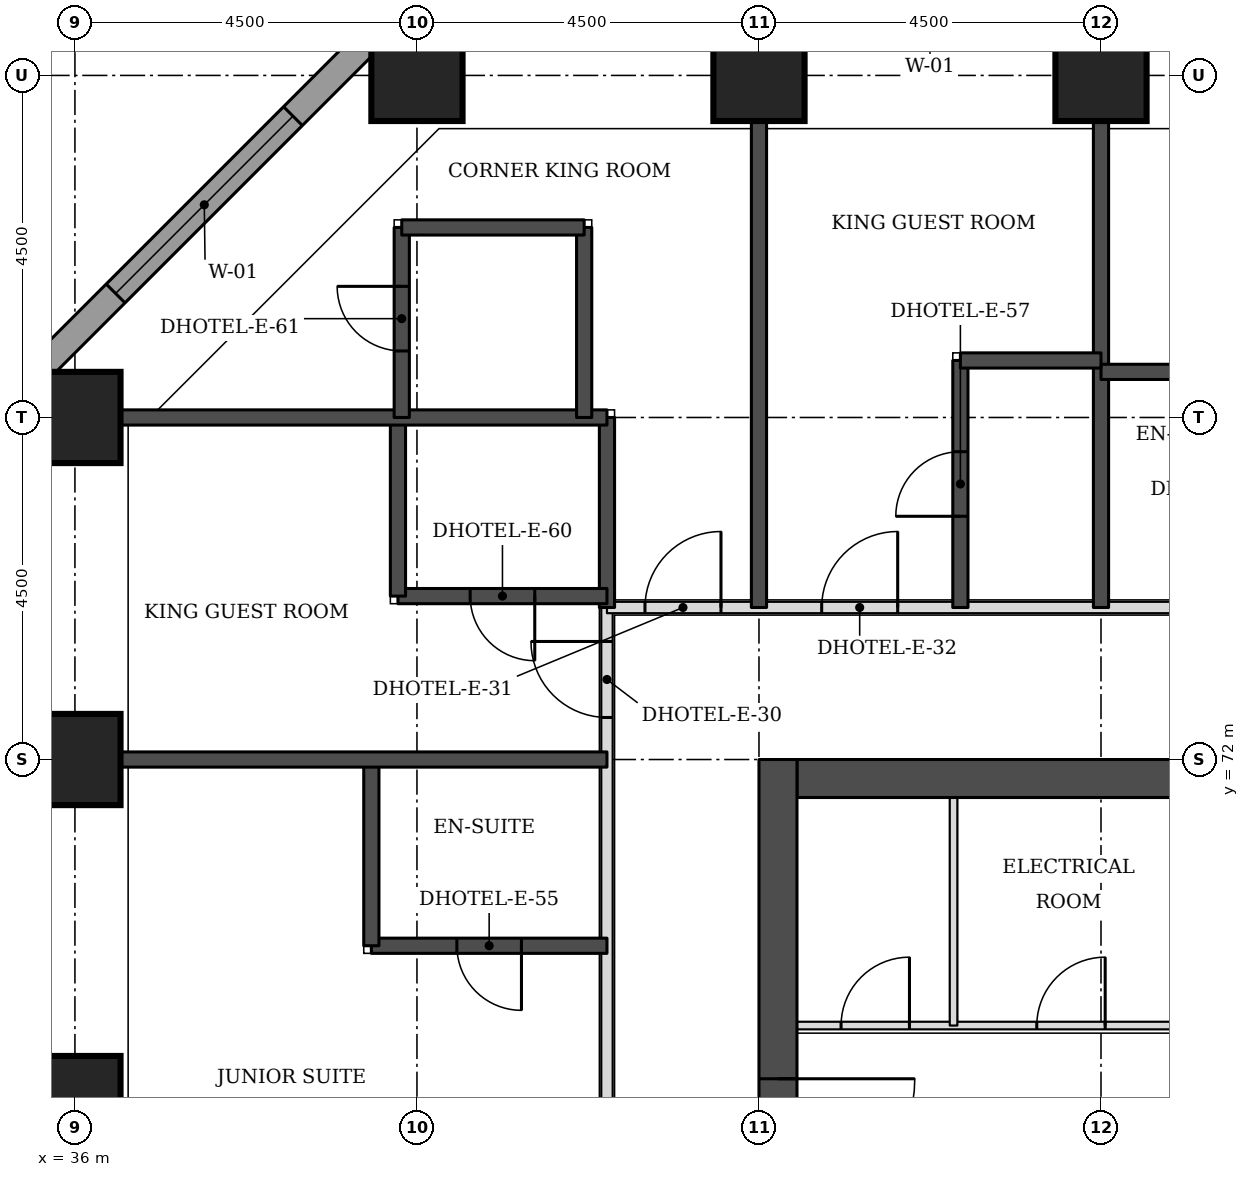
"""IFC4 building model, lengths in metres.
Left out: names, types, materials, properties, quantities, classifications, styles, units other than length and angle.
Written with IfcOpenShell. Run it as: python <this file> out.ifc"""

import sys

from ifc_helpers import new_model, si_unit, direction, frame, frame_2d, origin, origin_2d, place, context, subcontext, project, spatial, rectangle, extrude, element, fill, save


model = new_model("IFC4")
c1 = context("Model", 3, precision=1e-05, world=origin(), true_north=direction((0.0, 1.0)))
c2 = subcontext(c1, "Body", "Model", "MODEL_VIEW")
j1 = project(units=[si_unit("LENGTHUNIT", "METRE"), si_unit("PLANEANGLEUNIT", "RADIAN")], contexts=[c1])
p1 = place(None, origin())
s1 = spatial("IfcSite", under=j1, at=p1, CompositionType="ELEMENT")
p2 = place(p1, origin())
s2 = spatial("IfcBuilding", under=s1, at=p2, CompositionType="ELEMENT")
p3 = place(p2, frame((0.0, 0.0, 39.6)))
s3 = spatial("IfcBuildingStorey", under=s2, at=p3, CompositionType="ELEMENT", Elevation=39.6)
for number, where, z_axis, x_axis in (
    (1, (36.0, 67.5, 0.0), (0.0, 0.0, 1.0), (1.0, 0.0, 0.0)),
    (2, (36.0, 72.0, 0.0), (0.0, 0.0, 1.0), (1.0, 0.0, 0.0)),
    (3, (36.0, 76.5, 0.0), (0.0, 0.0, 1.0), (1.0, 0.0, 0.0)),
    (4, (40.5, 81.0, 0.0), (0.0, 0.0, 1.0), (1.0, 0.0, 0.0)),
    (5, (45.0, 81.0, 0.0), (0.0, 0.0, 1.0), (1.0, 0.0, 0.0)),
    (6, (49.5, 81.0, 0.0), (0.0, 0.0, 1.0), (1.0, 0.0, 0.0)),
):
    element("IfcColumn", number, at=place(p3, frame(where, z_axis=z_axis, x_axis=x_axis)), inside=s3, PredefinedType="COLUMN", context=c2, shape_type="SweptSolid", body=[
        extrude(rectangle(XDim=1.2, YDim=1.2, at=origin_2d()), origin(), (0.0, 0.0, 1.0), 3.3),
    ])
p4 = place(p3, frame((45.5, 71.75, 0.0), z_axis=(0.0, 0.0, 1.0), x_axis=(1.0, 0.0, 0.0)))
e7 = element("IfcWall", 7, at=p4, inside=s3, PredefinedType="SHEAR", context=c2, shape_type="SweptSolid", body=[
    extrude(rectangle(XDim=21.5, YDim=0.5, at=frame_2d((10.75, 0.0))), origin(), (0.0, 0.0, 1.0), 3.3),
])
p5 = place(p3, frame((45.25, 49.5, 0.0), z_axis=(0.0, 0.0, 1.0), x_axis=(0.0, 1.0, 0.0)))
e8 = element("IfcWall", 8, at=p5, inside=s3, PredefinedType="SHEAR", context=c2, shape_type="SweptSolid", body=[
    extrude(rectangle(XDim=22.5, YDim=0.5, at=frame_2d((11.25, 0.0))), origin(), (0.0, 0.0, 1.0), 3.3),
])
p6 = place(p5, frame((4.2, 0.0, 0.0)))
e9 = element("IfcOpeningElement", 9, at=p6, cuts=e8, PredefinedType="OPENING", context=c2, shape_type="SweptSolid", body=[
    extrude(rectangle(XDim=1.8, YDim=2.1, at=frame_2d((0.9, 1.05))), frame((0.0, 0.26, 0.0), z_axis=(0.0, -1.0, 0.0), x_axis=(1.0, 0.0, 0.0)), (0.0, 0.0, 1.0), 0.52),
])
p7 = place(p5, frame((6.9, 0.0, 0.0)))
e10 = element("IfcOpeningElement", 10, at=p7, cuts=e8, PredefinedType="OPENING", context=c2, shape_type="SweptSolid", body=[
    extrude(rectangle(XDim=1.1, YDim=2.1, at=frame_2d((0.55, 1.05))), frame((0.0, 0.26, 0.0), z_axis=(0.0, -1.0, 0.0), x_axis=(1.0, 0.0, 0.0)), (0.0, 0.0, 1.0), 0.52),
])
p8 = place(p5, frame((13.6, 0.0, 0.0)))
e11 = element("IfcOpeningElement", 11, at=p8, cuts=e8, PredefinedType="OPENING", context=c2, shape_type="SweptSolid", body=[
    extrude(rectangle(XDim=1.1, YDim=2.1, at=frame_2d((0.55, 1.05))), frame((0.0, 0.26, 0.0), z_axis=(0.0, -1.0, 0.0), x_axis=(1.0, 0.0, 0.0)), (0.0, 0.0, 1.0), 0.52),
])
p9 = place(p5, frame((16.5, 0.0, 0.0)))
e12 = element("IfcOpeningElement", 12, at=p9, cuts=e8, PredefinedType="OPENING", context=c2, shape_type="SweptSolid", body=[
    extrude(rectangle(XDim=1.8, YDim=2.1, at=frame_2d((0.9, 1.05))), frame((0.0, 0.26, 0.0), z_axis=(0.0, -1.0, 0.0), x_axis=(1.0, 0.0, 0.0)), (0.0, 0.0, 1.0), 0.52),
])
p10 = place(p3, frame((40.23, 81.826, 0.0), z_axis=(0.0, 0.0, 1.0), x_axis=(-0.707106781187, -0.707106781187, 0.0)))
e13 = element("IfcWall", 13, at=p10, inside=s3, PredefinedType="STANDARD", context=c2, shape_type="SweptSolid", body=[
    extrude(rectangle(XDim=7.151, YDim=0.35, at=frame_2d((3.576, 0.0))), origin(), (0.0, 0.0, 1.0), 3.055),
])
p11 = place(p10, frame((1.926, 0.0, 0.8)))
e14 = element("IfcOpeningElement", 14, at=p11, cuts=e13, PredefinedType="OPENING", context=c2, shape_type="SweptSolid", body=[
    extrude(rectangle(XDim=3.3, YDim=1.5, at=frame_2d((1.65, 0.75))), frame((0.0, 0.185, 0.0), z_axis=(0.0, -1.0, 0.0), x_axis=(1.0, 0.0, 0.0)), (0.0, 0.0, 1.0), 0.37),
])
p12 = place(p3, frame((43.0, 57.35, 0.0), z_axis=(0.0, 0.0, 1.0), x_axis=(0.0, 1.0, 0.0)))
e15 = element("IfcWall", 15, at=p12, inside=s3, PredefinedType="PARTITIONING", context=c2, shape_type="SweptSolid", body=[
    extrude(rectangle(XDim=16.65, YDim=0.15, at=frame_2d((8.325, 0.0))), origin(), (0.0, 0.0, 1.0), 3.08),
])
p13 = place(p12, frame((8.425, 0.0, 0.0)))
e16 = element("IfcOpeningElement", 16, at=p13, cuts=e15, PredefinedType="OPENING", context=c2, shape_type="SweptSolid", body=[
    extrude(rectangle(XDim=1.0, YDim=2.1, at=frame_2d((0.5, 1.05))), frame((0.0, 0.085, 0.0), z_axis=(0.0, -1.0, 0.0), x_axis=(1.0, 0.0, 0.0)), (0.0, 0.0, 1.0), 0.17),
])
p14 = place(p12, frame((15.203, 0.0, 0.0)))
e17 = element("IfcOpeningElement", 17, at=p14, cuts=e15, PredefinedType="OPENING", context=c2, shape_type="SweptSolid", body=[
    extrude(rectangle(XDim=1.0, YDim=2.1, at=frame_2d((0.5, 1.05))), frame((0.0, 0.085, 0.0), z_axis=(0.0, -1.0, 0.0), x_axis=(1.0, 0.0, 0.0)), (0.0, 0.0, 1.0), 0.17),
])
p15 = place(p3, frame((43.0, 74.0, 0.0), z_axis=(0.0, 0.0, 1.0), x_axis=(1.0, 0.0, 0.0)))
e18 = element("IfcWall", 18, at=p15, inside=s3, PredefinedType="PARTITIONING", context=c2, shape_type="SweptSolid", body=[
    extrude(rectangle(XDim=26.5, YDim=0.15, at=frame_2d((13.25, 0.0))), origin(), (0.0, 0.0, 1.0), 3.08),
])
p16 = place(p15, frame((2.825, 0.0, 0.0)))
e19 = element("IfcOpeningElement", 19, at=p16, cuts=e18, PredefinedType="OPENING", context=c2, shape_type="SweptSolid", body=[
    extrude(rectangle(XDim=1.0, YDim=2.1, at=frame_2d((0.5, 1.05))), frame((0.0, 0.085, 0.0), z_axis=(0.0, -1.0, 0.0), x_axis=(1.0, 0.0, 0.0)), (0.0, 0.0, 1.0), 0.17),
])
p17 = place(p15, frame((11.975, 0.0, 0.0)))
e20 = element("IfcOpeningElement", 20, at=p17, cuts=e18, PredefinedType="OPENING", context=c2, shape_type="SweptSolid", body=[
    extrude(rectangle(XDim=1.0, YDim=2.1, at=frame_2d((0.5, 1.05))), frame((0.0, 0.085, 0.0), z_axis=(0.0, -1.0, 0.0), x_axis=(1.0, 0.0, 0.0)), (0.0, 0.0, 1.0), 0.17),
])
p18 = place(p15, frame((18.275, 0.0, 0.0)))
e21 = element("IfcOpeningElement", 21, at=p18, cuts=e18, PredefinedType="OPENING", context=c2, shape_type="SweptSolid", body=[
    extrude(rectangle(XDim=1.0, YDim=2.1, at=frame_2d((0.5, 1.05))), frame((0.0, 0.085, 0.0), z_axis=(0.0, -1.0, 0.0), x_axis=(1.0, 0.0, 0.0)), (0.0, 0.0, 1.0), 0.17),
])
p19 = place(p15, frame((0.5, 0.0, 0.0)))
e22 = element("IfcOpeningElement", 22, at=p19, cuts=e18, PredefinedType="OPENING", context=c2, shape_type="SweptSolid", body=[
    extrude(rectangle(XDim=1.0, YDim=2.1, at=frame_2d((0.5, 1.05))), frame((0.0, 0.085, 0.0), z_axis=(0.0, -1.0, 0.0), x_axis=(1.0, 0.0, 0.0)), (0.0, 0.0, 1.0), 0.17),
])
p20 = place(p15, frame((25.0, 0.0, 0.0)))
e23 = element("IfcOpeningElement", 23, at=p20, cuts=e18, PredefinedType="OPENING", context=c2, shape_type="SweptSolid", body=[
    extrude(rectangle(XDim=1.0, YDim=2.1, at=frame_2d((0.5, 1.05))), frame((0.0, 0.085, 0.0), z_axis=(0.0, -1.0, 0.0), x_axis=(1.0, 0.0, 0.0)), (0.0, 0.0, 1.0), 0.17),
])
p21 = place(p3, frame((39.9, 69.55, 0.0), z_axis=(0.0, 0.0, 1.0), x_axis=(1.0, 0.0, 0.0)))
e24 = element("IfcWall", 24, at=p21, inside=s3, PredefinedType="SOLIDWALL", context=c2, shape_type="SweptSolid", body=[
    extrude(rectangle(XDim=3.1, YDim=0.2, at=frame_2d((1.55, 0.0))), origin(), (0.0, 0.0, 1.0), 3.08),
])
p22 = place(p21, frame((1.125, 0.0, 0.0)))
e25 = element("IfcOpeningElement", 25, at=p22, cuts=e24, PredefinedType="OPENING", context=c2, shape_type="SweptSolid", body=[
    extrude(rectangle(XDim=0.85, YDim=2.1, at=frame_2d((0.425, 1.05))), frame((0.0, 0.11, 0.0), z_axis=(0.0, -1.0, 0.0), x_axis=(1.0, 0.0, 0.0)), (0.0, 0.0, 1.0), 0.22),
])
p23 = place(p3, frame((39.9, 69.55, 0.0), z_axis=(0.0, 0.0, 1.0), x_axis=(0.0, 1.0, 0.0)))
e26 = element("IfcWall", 26, at=p23, inside=s3, PredefinedType="SOLIDWALL", context=c2, shape_type="SweptSolid", body=[
    extrude(rectangle(XDim=2.45, YDim=0.2, at=frame_2d((1.225, 0.0))), origin(), (0.0, 0.0, 1.0), 3.08),
])
p24 = place(p3, frame((36.6, 72.0, 0.0), z_axis=(0.0, 0.0, 1.0), x_axis=(1.0, 0.0, 0.0)))
e27 = element("IfcWall", 27, at=p24, inside=s3, PredefinedType="SOLIDWALL", context=c2, shape_type="SweptSolid", body=[
    extrude(rectangle(XDim=6.4, YDim=0.2, at=frame_2d((3.2, 0.0))), origin(), (0.0, 0.0, 1.0), 3.08),
])
p25 = place(p3, frame((43.0, 74.0, 0.0), z_axis=(0.0, 0.0, 1.0), x_axis=(0.0, 1.0, 0.0)))
e28 = element("IfcWall", 28, at=p25, inside=s3, PredefinedType="SOLIDWALL", context=c2, shape_type="SweptSolid", body=[
    extrude(rectangle(XDim=2.5, YDim=0.2, at=frame_2d((1.25, 0.0))), origin(), (0.0, 0.0, 1.0), 3.08),
])
p26 = place(p3, frame((45.0, 74.0, 0.0), z_axis=(0.0, 0.0, 1.0), x_axis=(0.0, 1.0, 0.0)))
e29 = element("IfcWall", 29, at=p26, inside=s3, PredefinedType="SOLIDWALL", context=c2, shape_type="SweptSolid", body=[
    extrude(rectangle(XDim=6.4, YDim=0.2, at=frame_2d((3.2, 0.0))), origin(), (0.0, 0.0, 1.0), 3.08),
])
p27 = place(p3, frame((47.65, 74.0, 0.0), z_axis=(0.0, 0.0, 1.0), x_axis=(0.0, 1.0, 0.0)))
e30 = element("IfcWall", 30, at=p27, inside=s3, PredefinedType="SOLIDWALL", context=c2, shape_type="SweptSolid", body=[
    extrude(rectangle(XDim=3.25, YDim=0.2, at=frame_2d((1.625, 0.0))), origin(), (0.0, 0.0, 1.0), 3.08),
])
p28 = place(p27, frame((1.2, 0.0, 0.0)))
e31 = element("IfcOpeningElement", 31, at=p28, cuts=e30, PredefinedType="OPENING", context=c2, shape_type="SweptSolid", body=[
    extrude(rectangle(XDim=0.85, YDim=2.1, at=frame_2d((0.425, 1.05))), frame((0.0, 0.11, 0.0), z_axis=(0.0, -1.0, 0.0), x_axis=(1.0, 0.0, 0.0)), (0.0, 0.0, 1.0), 0.22),
])
p29 = place(p3, frame((49.5, 74.0, 0.0), z_axis=(0.0, 0.0, 1.0), x_axis=(0.0, 1.0, 0.0)))
e32 = element("IfcWall", 32, at=p29, inside=s3, PredefinedType="SOLIDWALL", context=c2, shape_type="SweptSolid", body=[
    extrude(rectangle(XDim=6.4, YDim=0.2, at=frame_2d((3.2, 0.0))), origin(), (0.0, 0.0, 1.0), 3.08),
])
p30 = place(p3, frame((40.25, 74.15, 0.0), z_axis=(0.0, 0.0, 1.0), x_axis=(1.0, 0.0, 0.0)))
e33 = element("IfcWall", 33, at=p30, inside=s3, PredefinedType="SOLIDWALL", context=c2, shape_type="SweptSolid", body=[
    extrude(rectangle(XDim=2.75, YDim=0.2, at=frame_2d((1.375, 0.0))), origin(), (0.0, 0.0, 1.0), 3.08),
])
p31 = place(p30, frame((0.95, 0.0, 0.0)))
e34 = element("IfcOpeningElement", 34, at=p31, cuts=e33, PredefinedType="OPENING", context=c2, shape_type="SweptSolid", body=[
    extrude(rectangle(XDim=0.85, YDim=2.1, at=frame_2d((0.425, 1.05))), frame((0.0, 0.11, 0.0), z_axis=(0.0, -1.0, 0.0), x_axis=(1.0, 0.0, 0.0)), (0.0, 0.0, 1.0), 0.22),
])
p32 = place(p3, frame((40.25, 74.15, 0.0), z_axis=(0.0, 0.0, 1.0), x_axis=(0.0, 1.0, 0.0)))
e35 = element("IfcWall", 35, at=p32, inside=s3, PredefinedType="SOLIDWALL", context=c2, shape_type="SweptSolid", body=[
    extrude(rectangle(XDim=2.35, YDim=0.2, at=frame_2d((1.175, 0.0))), origin(), (0.0, 0.0, 1.0), 3.08),
])
p33 = place(p3, frame((36.6, 76.5, 0.0), z_axis=(0.0, 0.0, 1.0), x_axis=(1.0, 0.0, 0.0)))
e36 = element("IfcWall", 36, at=p33, inside=s3, PredefinedType="SOLIDWALL", context=c2, shape_type="SweptSolid", body=[
    extrude(rectangle(XDim=6.4, YDim=0.2, at=frame_2d((3.2, 0.0))), origin(), (0.0, 0.0, 1.0), 3.08),
])
p34 = place(p3, frame((40.3, 76.5, 0.0), z_axis=(0.0, 0.0, 1.0), x_axis=(0.0, 1.0, 0.0)))
e37 = element("IfcWall", 37, at=p34, inside=s3, PredefinedType="SOLIDWALL", context=c2, shape_type="SweptSolid", body=[
    extrude(rectangle(XDim=2.5, YDim=0.2, at=frame_2d((1.25, 0.0))), origin(), (0.0, 0.0, 1.0), 3.08),
])
p35 = place(p34, frame((0.875, 0.0, 0.0)))
e38 = element("IfcOpeningElement", 38, at=p35, cuts=e37, PredefinedType="OPENING", context=c2, shape_type="SweptSolid", body=[
    extrude(rectangle(XDim=0.85, YDim=2.1, at=frame_2d((0.425, 1.05))), frame((0.0, 0.11, 0.0), z_axis=(0.0, -1.0, 0.0), x_axis=(1.0, 0.0, 0.0)), (0.0, 0.0, 1.0), 0.22),
])
p36 = place(p3, frame((42.7, 76.5, 0.0), z_axis=(0.0, 0.0, 1.0), x_axis=(0.0, 1.0, 0.0)))
e39 = element("IfcWall", 39, at=p36, inside=s3, PredefinedType="SOLIDWALL", context=c2, shape_type="SweptSolid", body=[
    extrude(rectangle(XDim=2.5, YDim=0.2, at=frame_2d((1.25, 0.0))), origin(), (0.0, 0.0, 1.0), 3.08),
])
p37 = place(p3, frame((49.5, 77.1, 0.0), z_axis=(0.0, 0.0, 1.0), x_axis=(1.0, 0.0, 0.0)))
e40 = element("IfcWall", 40, at=p37, inside=s3, PredefinedType="SOLIDWALL", context=c2, shape_type="SweptSolid", body=[
    extrude(rectangle(XDim=2.95, YDim=0.2, at=frame_2d((1.475, 0.0))), origin(), (0.0, 0.0, 1.0), 3.08),
])
p38 = place(p3, frame((47.65, 77.25, 0.0), z_axis=(0.0, 0.0, 1.0), x_axis=(1.0, 0.0, 0.0)))
e41 = element("IfcWall", 41, at=p38, inside=s3, PredefinedType="SOLIDWALL", context=c2, shape_type="SweptSolid", body=[
    extrude(rectangle(XDim=1.85, YDim=0.2, at=frame_2d((0.925, 0.0))), origin(), (0.0, 0.0, 1.0), 3.08),
])
p39 = place(p3, frame((40.3, 79.0, 0.0), z_axis=(0.0, 0.0, 1.0), x_axis=(1.0, 0.0, 0.0)))
e42 = element("IfcWall", 42, at=p39, inside=s3, PredefinedType="SOLIDWALL", context=c2, shape_type="SweptSolid", body=[
    extrude(rectangle(XDim=2.4, YDim=0.2, at=frame_2d((1.2, 0.0))), origin(), (0.0, 0.0, 1.0), 3.08),
])
p40 = place(p3, frame((45.5, 68.5, 0.0), z_axis=(0.0, 0.0, 1.0), x_axis=(1.0, 0.0, 0.0)))
e43 = element("IfcWall", 43, at=p40, inside=s3, PredefinedType="PARTITIONING", context=c2, shape_type="SweptSolid", body=[
    extrude(rectangle(XDim=5.15, YDim=0.1, at=frame_2d((2.575, 0.0))), origin(), (0.0, 0.0, 1.0), 3.08),
])
p41 = place(p40, frame((0.58, 0.0, 0.0)))
e44 = element("IfcOpeningElement", 44, at=p41, cuts=e43, PredefinedType="OPENING", context=c2, shape_type="SweptSolid", body=[
    extrude(rectangle(XDim=0.9, YDim=2.1, at=frame_2d((0.45, 1.05))), frame((0.0, 0.06, 0.0), z_axis=(0.0, -1.0, 0.0), x_axis=(1.0, 0.0, 0.0)), (0.0, 0.0, 1.0), 0.12),
])
p42 = place(p40, frame((3.155, 0.0, 0.0)))
e45 = element("IfcOpeningElement", 45, at=p42, cuts=e43, PredefinedType="OPENING", context=c2, shape_type="SweptSolid", body=[
    extrude(rectangle(XDim=0.9, YDim=2.1, at=frame_2d((0.45, 1.05))), frame((0.0, 0.06, 0.0), z_axis=(0.0, -1.0, 0.0), x_axis=(1.0, 0.0, 0.0)), (0.0, 0.0, 1.0), 0.12),
])
p43 = place(p3, frame((47.56, 68.5, 0.0), z_axis=(0.0, 0.0, 1.0), x_axis=(0.0, 1.0, 0.0)))
e46 = element("IfcWall", 46, at=p43, inside=s3, PredefinedType="PARTITIONING", context=c2, shape_type="SweptSolid", body=[
    extrude(rectangle(XDim=3.0, YDim=0.1, at=frame_2d((1.5, 0.0))), origin(), (0.0, 0.0, 1.0), 3.08),
])
p44 = place(p11, origin())
e47 = element("IfcWindow", 47, at=p44, inside=s3, PartitioningType="SINGLE_PANEL", PredefinedType="WINDOW", context=c2, shape_type="SweptSolid", body=[
    extrude(rectangle(XDim=3.3, YDim=1.5, at=frame_2d((1.65, 0.75))), frame((0.0, 0.085, 0.0), z_axis=(0.0, -1.0, 0.0), x_axis=(1.0, 0.0, 0.0)), (0.0, 0.0, 1.0), 0.06),
])
fill(e14, e47)
p45 = place(p22, frame((0.85, 0.0, 0.0), z_axis=(0.0, 0.0, 1.0), x_axis=(-1.0, 0.0, 0.0)))
e48 = element("IfcDoor", 48, at=p45, inside=s3, OperationType="SINGLE_SWING_LEFT", PredefinedType="DOOR", context=c2, shape_type="SweptSolid", body=[
    extrude(rectangle(XDim=0.85, YDim=2.1, at=frame_2d((0.425, 1.05))), frame((0.0, 0.025, 0.0), z_axis=(0.0, -1.0, 0.0), x_axis=(1.0, 0.0, 0.0)), (0.0, 0.0, 1.0), 0.05),
])
fill(e25, e48)
p46 = place(p14, origin())
e49 = element("IfcDoor", 49, at=p46, inside=s3, OperationType="SINGLE_SWING_RIGHT", PredefinedType="DOOR", context=c2, shape_type="SweptSolid", body=[
    extrude(rectangle(XDim=1.0, YDim=2.1, at=frame_2d((0.5, 1.05))), frame((0.0, 0.025, 0.0), z_axis=(0.0, -1.0, 0.0), x_axis=(1.0, 0.0, 0.0)), (0.0, 0.0, 1.0), 0.05),
])
fill(e17, e49)
p47 = place(p31, frame((0.85, 0.0, 0.0), z_axis=(0.0, 0.0, 1.0), x_axis=(-1.0, 0.0, 0.0)))
e50 = element("IfcDoor", 50, at=p47, inside=s3, OperationType="SINGLE_SWING_LEFT", PredefinedType="DOOR", context=c2, shape_type="SweptSolid", body=[
    extrude(rectangle(XDim=0.85, YDim=2.1, at=frame_2d((0.425, 1.05))), frame((0.0, 0.025, 0.0), z_axis=(0.0, -1.0, 0.0), x_axis=(1.0, 0.0, 0.0)), (0.0, 0.0, 1.0), 0.05),
])
fill(e34, e50)
p48 = place(p16, origin())
e51 = element("IfcDoor", 51, at=p48, inside=s3, OperationType="SINGLE_SWING_RIGHT", PredefinedType="DOOR", context=c2, shape_type="SweptSolid", body=[
    extrude(rectangle(XDim=1.0, YDim=2.1, at=frame_2d((0.5, 1.05))), frame((0.0, 0.025, 0.0), z_axis=(0.0, -1.0, 0.0), x_axis=(1.0, 0.0, 0.0)), (0.0, 0.0, 1.0), 0.05),
])
fill(e19, e51)
p49 = place(p28, origin())
e52 = element("IfcDoor", 52, at=p49, inside=s3, OperationType="SINGLE_SWING_LEFT", PredefinedType="DOOR", context=c2, shape_type="SweptSolid", body=[
    extrude(rectangle(XDim=0.85, YDim=2.1, at=frame_2d((0.425, 1.05))), frame((0.0, 0.025, 0.0), z_axis=(0.0, -1.0, 0.0), x_axis=(1.0, 0.0, 0.0)), (0.0, 0.0, 1.0), 0.05),
])
fill(e31, e52)
p50 = place(p19, origin())
e53 = element("IfcDoor", 53, at=p50, inside=s3, OperationType="SINGLE_SWING_RIGHT", PredefinedType="DOOR", context=c2, shape_type="SweptSolid", body=[
    extrude(rectangle(XDim=1.0, YDim=2.1, at=frame_2d((0.5, 1.05))), frame((0.0, 0.025, 0.0), z_axis=(0.0, -1.0, 0.0), x_axis=(1.0, 0.0, 0.0)), (0.0, 0.0, 1.0), 0.05),
])
fill(e22, e53)
p51 = place(p35, origin())
e54 = element("IfcDoor", 54, at=p51, inside=s3, OperationType="SINGLE_SWING_RIGHT", PredefinedType="DOOR", context=c2, shape_type="SweptSolid", body=[
    extrude(rectangle(XDim=0.85, YDim=2.1, at=frame_2d((0.425, 1.05))), frame((0.0, 0.025, 0.0), z_axis=(0.0, -1.0, 0.0), x_axis=(1.0, 0.0, 0.0)), (0.0, 0.0, 1.0), 0.05),
])
fill(e38, e54)
p52 = place(p9, frame((1.8, 0.0, 0.0), z_axis=(0.0, 0.0, 1.0), x_axis=(-1.0, 0.0, 0.0)))
e55 = element("IfcDoor", 55, at=p52, inside=s3, OperationType="SINGLE_SWING_LEFT", PredefinedType="DOOR", context=c2, shape_type="SweptSolid", body=[
    extrude(rectangle(XDim=1.8, YDim=2.1, at=frame_2d((0.9, 1.05))), frame((0.0, 0.025, 0.0), z_axis=(0.0, -1.0, 0.0), x_axis=(1.0, 0.0, 0.0)), (0.0, 0.0, 1.0), 0.05),
])
fill(e12, e55)
p53 = place(p41, origin())
e56 = element("IfcDoor", 56, at=p53, inside=s3, OperationType="SINGLE_SWING_RIGHT", PredefinedType="DOOR", context=c2, shape_type="SweptSolid", body=[
    extrude(rectangle(XDim=0.9, YDim=2.1, at=frame_2d((0.45, 1.05))), frame((0.0, 0.025, 0.0), z_axis=(0.0, -1.0, 0.0), x_axis=(1.0, 0.0, 0.0)), (0.0, 0.0, 1.0), 0.05),
])
fill(e44, e56)
p54 = place(p42, origin())
e57 = element("IfcDoor", 57, at=p54, inside=s3, OperationType="SINGLE_SWING_RIGHT", PredefinedType="DOOR", context=c2, shape_type="SweptSolid", body=[
    extrude(rectangle(XDim=0.9, YDim=2.1, at=frame_2d((0.45, 1.05))), frame((0.0, 0.025, 0.0), z_axis=(0.0, -1.0, 0.0), x_axis=(1.0, 0.0, 0.0)), (0.0, 0.0, 1.0), 0.05),
])
fill(e45, e57)
save(model, sys.argv[1])
